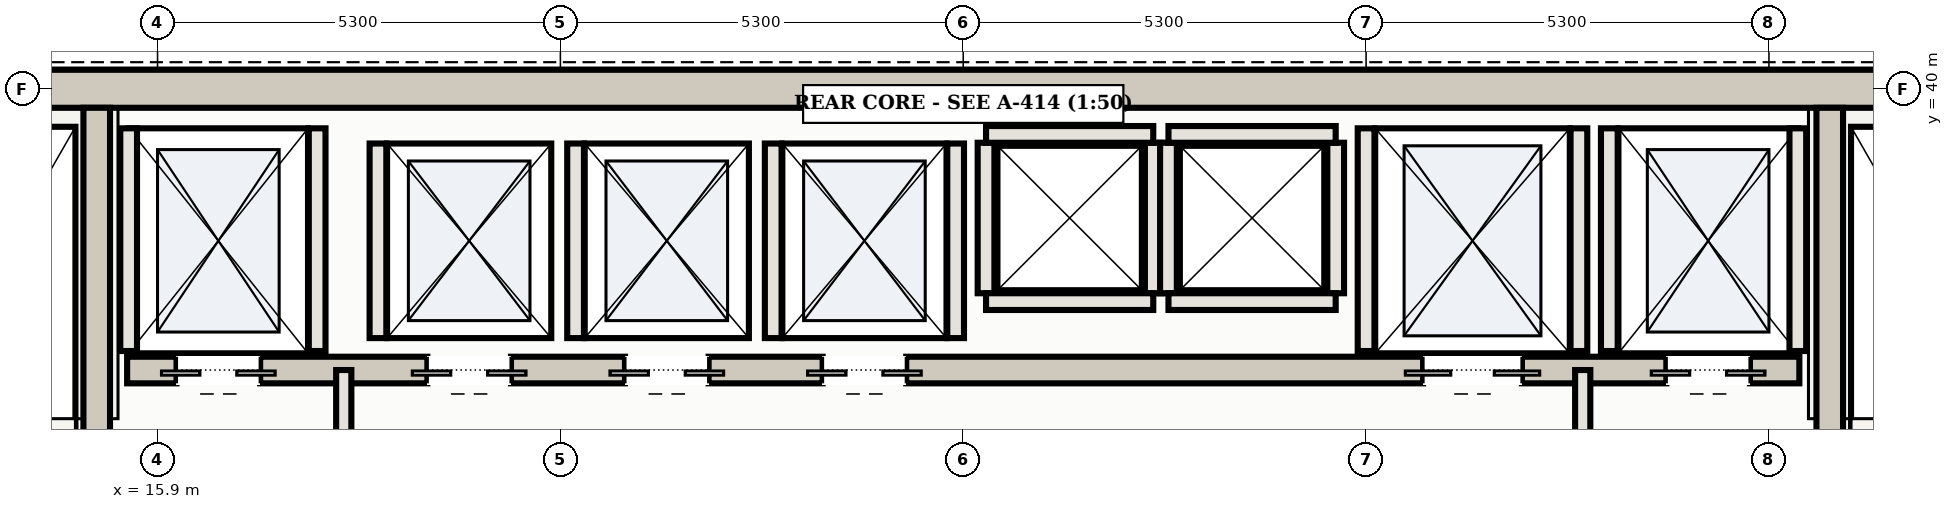
"""IFC4 building model, lengths in metres.
Left out: names, types, materials, properties, quantities, classifications, styles, units other than length and angle.
Written with IfcOpenShell. Run it as: python <this file> out.ifc"""

import sys

from ifc_helpers import new_model, si_unit, direction, frame, frame_2d, origin, place, context, subcontext, project, spatial, rectangle, extrude, element, fill, save


model = new_model("IFC4")
c1 = context("Model", 3, precision=1e-05, world=origin(), true_north=direction((0.0, 1.0)))
c2 = subcontext(c1, "Body", "Model", "MODEL_VIEW")
j1 = project(units=[si_unit("LENGTHUNIT", "METRE"), si_unit("PLANEANGLEUNIT", "RADIAN")], contexts=[c1])
p1 = place(None, origin())
s1 = spatial("IfcSite", under=j1, at=p1, CompositionType="ELEMENT")
p2 = place(p1, origin())
s2 = spatial("IfcBuilding", under=s1, at=p2, CompositionType="ELEMENT")
p3 = place(p2, frame((0.0, 0.0, 219.8)))
s3 = spatial("IfcBuildingStorey", under=s2, at=p3, CompositionType="ELEMENT", Elevation=219.8)
p4 = place(p3, frame((10.35, 40.0, 0.0), z_axis=(0.0, 0.0, 1.0), x_axis=(1.0, 0.0, 0.0)))
e1 = element("IfcWall", 1, at=p4, inside=s3, PredefinedType="SHEAR", context=c2, shape_type="SweptSolid", body=[
    extrude(rectangle(XDim=32.3, YDim=0.5, at=frame_2d((16.15, 0.0))), origin(), (0.0, 0.0, 1.0), 3.11),
])
p5 = place(p3, frame((15.1, 31.1, 0.0), z_axis=(0.0, 0.0, 1.0), x_axis=(0.0, 1.0, 0.0)))
e2 = element("IfcWall", 2, at=p5, inside=s3, PredefinedType="SHEAR", context=c2, shape_type="SweptSolid", body=[
    extrude(rectangle(XDim=8.65, YDim=0.35, at=frame_2d((4.325, 0.0))), origin(), (0.0, 0.0, 1.0), 3.11),
])
p6 = place(p5, frame((0.51, 0.0, 0.0)))
e3 = element("IfcOpeningElement", 3, at=p6, cuts=e2, PredefinedType="OPENING", context=c2, shape_type="SweptSolid", body=[
    extrude(rectangle(XDim=1.15, YDim=2.2, at=frame_2d((0.575, 1.1))), frame((0.0, 0.185, 0.0), z_axis=(0.0, -1.0, 0.0), x_axis=(1.0, 0.0, 0.0)), (0.0, 0.0, 1.0), 0.37),
])
p7 = place(p3, frame((37.9, 31.1, 0.0), z_axis=(0.0, 0.0, 1.0), x_axis=(0.0, 1.0, 0.0)))
e4 = element("IfcWall", 4, at=p7, inside=s3, PredefinedType="SHEAR", context=c2, shape_type="SweptSolid", body=[
    extrude(rectangle(XDim=8.65, YDim=0.35, at=frame_2d((4.325, 0.0))), origin(), (0.0, 0.0, 1.0), 3.11),
])
p8 = place(p7, frame((0.51, 0.0, 0.0)))
e5 = element("IfcOpeningElement", 5, at=p8, cuts=e4, PredefinedType="OPENING", context=c2, shape_type="SweptSolid", body=[
    extrude(rectangle(XDim=1.15, YDim=2.2, at=frame_2d((0.575, 1.1))), frame((0.0, 0.185, 0.0), z_axis=(0.0, -1.0, 0.0), x_axis=(1.0, 0.0, 0.0)), (0.0, 0.0, 1.0), 0.37),
])
p9 = place(p3, frame((15.5, 36.3, 0.0), z_axis=(0.0, 0.0, 1.0), x_axis=(1.0, 0.0, 0.0)))
e6 = element("IfcWall", 6, at=p9, inside=s3, PredefinedType="SHEAR", context=c2, shape_type="SweptSolid", body=[
    extrude(rectangle(XDim=22.0, YDim=0.35, at=frame_2d((11.0, 0.0))), origin(), (0.0, 0.0, 1.0), 3.11),
])
p10 = place(p9, frame((0.65, 0.0, 0.0)))
e7 = element("IfcOpeningElement", 7, at=p10, cuts=e6, PredefinedType="OPENING", context=c2, shape_type="SweptSolid", body=[
    extrude(rectangle(XDim=1.1, YDim=2.15, at=frame_2d((0.55, 1.075))), frame((0.0, 0.185, 0.0), z_axis=(0.0, -1.0, 0.0), x_axis=(1.0, 0.0, 0.0)), (0.0, 0.0, 1.0), 0.37),
])
p11 = place(p9, frame((20.25, 0.0, 0.0)))
e8 = element("IfcOpeningElement", 8, at=p11, cuts=e6, PredefinedType="OPENING", context=c2, shape_type="SweptSolid", body=[
    extrude(rectangle(XDim=1.1, YDim=2.15, at=frame_2d((0.55, 1.075))), frame((0.0, 0.185, 0.0), z_axis=(0.0, -1.0, 0.0), x_axis=(1.0, 0.0, 0.0)), (0.0, 0.0, 1.0), 0.37),
])
p12 = place(p9, frame((17.05, 0.0, 0.0)))
e9 = element("IfcOpeningElement", 9, at=p12, cuts=e6, PredefinedType="OPENING", context=c2, shape_type="SweptSolid", body=[
    extrude(rectangle(XDim=1.3, YDim=2.2, at=frame_2d((0.65, 1.1))), frame((0.0, 0.185, 0.0), z_axis=(0.0, -1.0, 0.0), x_axis=(1.0, 0.0, 0.0)), (0.0, 0.0, 1.0), 0.37),
])
p13 = place(p9, frame((3.95, 0.0, 0.0)))
e10 = element("IfcOpeningElement", 10, at=p13, cuts=e6, PredefinedType="OPENING", context=c2, shape_type="SweptSolid", body=[
    extrude(rectangle(XDim=1.1, YDim=2.15, at=frame_2d((0.55, 1.075))), frame((0.0, 0.185, 0.0), z_axis=(0.0, -1.0, 0.0), x_axis=(1.0, 0.0, 0.0)), (0.0, 0.0, 1.0), 0.37),
])
p14 = place(p9, frame((6.55, 0.0, 0.0)))
e11 = element("IfcOpeningElement", 11, at=p14, cuts=e6, PredefinedType="OPENING", context=c2, shape_type="SweptSolid", body=[
    extrude(rectangle(XDim=1.1, YDim=2.15, at=frame_2d((0.55, 1.075))), frame((0.0, 0.185, 0.0), z_axis=(0.0, -1.0, 0.0), x_axis=(1.0, 0.0, 0.0)), (0.0, 0.0, 1.0), 0.37),
])
p15 = place(p9, frame((9.15, 0.0, 0.0)))
e12 = element("IfcOpeningElement", 12, at=p15, cuts=e6, PredefinedType="OPENING", context=c2, shape_type="SweptSolid", body=[
    extrude(rectangle(XDim=1.1, YDim=2.15, at=frame_2d((0.55, 1.075))), frame((0.0, 0.185, 0.0), z_axis=(0.0, -1.0, 0.0), x_axis=(1.0, 0.0, 0.0)), (0.0, 0.0, 1.0), 0.37),
])
for number, where, z_axis, x_axis in (
    (13, (15.52, 36.55, 0.0), (0.0, 0.0, 1.0), (0.0, 1.0, 0.0)),
    (14, (18.0, 36.55, 0.0), (0.0, 0.0, 1.0), (0.0, 1.0, 0.0)),
    (15, (35.0, 36.55, 0.0), (0.0, 0.0, 1.0), (0.0, 1.0, 0.0)),
    (16, (37.48, 36.55, 0.0), (0.0, 0.0, 1.0), (0.0, 1.0, 0.0)),
    (17, (31.8, 36.55, 0.0), (0.0, 0.0, 1.0), (0.0, 1.0, 0.0)),
    (18, (34.6, 36.55, 0.0), (0.0, 0.0, 1.0), (0.0, 1.0, 0.0)),
):
    element("IfcWall", number, at=place(p3, frame(where, z_axis=z_axis, x_axis=x_axis)), inside=s3, PredefinedType="SOLIDWALL", context=c2, shape_type="SweptSolid", body=[
        extrude(rectangle(XDim=2.93, YDim=0.22, at=frame_2d((1.465, 0.0))), origin(), (0.0, 0.0, 1.0), 3.11),
    ])
for number, where, z_axis, x_axis in (
    (19, (18.8, 36.72, 0.0), (0.0, 0.0, 1.0), (0.0, 1.0, 0.0)),
    (20, (21.4, 36.72, 0.0), (0.0, 0.0, 1.0), (0.0, 1.0, 0.0)),
    (21, (24.0, 36.72, 0.0), (0.0, 0.0, 1.0), (0.0, 1.0, 0.0)),
    (22, (26.4, 36.72, 0.0), (0.0, 0.0, 1.0), (0.0, 1.0, 0.0)),
):
    element("IfcWall", number, at=place(p3, frame(where, z_axis=z_axis, x_axis=x_axis)), inside=s3, PredefinedType="SOLIDWALL", context=c2, shape_type="SweptSolid", body=[
        extrude(rectangle(XDim=2.56, YDim=0.22, at=frame_2d((1.28, 0.0))), origin(), (0.0, 0.0, 1.0), 3.11),
    ])
for number, where, z_axis, x_axis in (
    (23, (26.8, 37.31, 0.0), (0.0, 0.0, 1.0), (0.0, 1.0, 0.0)),
    (24, (29.0, 37.31, 0.0), (0.0, 0.0, 1.0), (0.0, 1.0, 0.0)),
):
    element("IfcWall", number, at=place(p3, frame(where, z_axis=z_axis, x_axis=x_axis)), inside=s3, PredefinedType="SOLIDWALL", context=c2, shape_type="SweptSolid", body=[
        extrude(rectangle(XDim=1.98, YDim=0.22, at=frame_2d((0.99, 0.0))), origin(), (0.0, 0.0, 1.0), 3.11),
    ])
for number, where, z_axis, x_axis in (
    (25, (26.8, 39.4, 0.0), (0.0, 0.0, 1.0), (1.0, 0.0, 0.0)),
    (26, (26.8, 37.2, 0.0), (0.0, 0.0, 1.0), (1.0, 0.0, 0.0)),
):
    element("IfcWall", number, at=place(p3, frame(where, z_axis=z_axis, x_axis=x_axis)), inside=s3, PredefinedType="SOLIDWALL", context=c2, shape_type="SweptSolid", body=[
        extrude(rectangle(XDim=2.2, YDim=0.22, at=frame_2d((1.1, 0.0))), origin(), (0.0, 0.0, 1.0), 3.11),
    ])
for number, where, z_axis, x_axis in (
    (27, (29.2, 37.31, 0.0), (0.0, 0.0, 1.0), (0.0, 1.0, 0.0)),
    (28, (31.4, 37.31, 0.0), (0.0, 0.0, 1.0), (0.0, 1.0, 0.0)),
):
    element("IfcWall", number, at=place(p3, frame(where, z_axis=z_axis, x_axis=x_axis)), inside=s3, PredefinedType="SOLIDWALL", context=c2, shape_type="SweptSolid", body=[
        extrude(rectangle(XDim=1.98, YDim=0.22, at=frame_2d((0.99, 0.0))), origin(), (0.0, 0.0, 1.0), 3.11),
    ])
for number, where, z_axis, x_axis in (
    (29, (29.2, 39.4, 0.0), (0.0, 0.0, 1.0), (1.0, 0.0, 0.0)),
    (30, (29.2, 37.2, 0.0), (0.0, 0.0, 1.0), (1.0, 0.0, 0.0)),
):
    element("IfcWall", number, at=place(p3, frame(where, z_axis=z_axis, x_axis=x_axis)), inside=s3, PredefinedType="SOLIDWALL", context=c2, shape_type="SweptSolid", body=[
        extrude(rectangle(XDim=2.2, YDim=0.22, at=frame_2d((1.1, 0.0))), origin(), (0.0, 0.0, 1.0), 3.11),
    ])
p16 = place(p3, frame((18.35, 31.15, 0.0), z_axis=(0.0, 0.0, 1.0), x_axis=(0.0, 1.0, 0.0)))
e31 = element("IfcWall", 31, at=p16, inside=s3, PredefinedType="PARTITIONING", context=c2, shape_type="SweptSolid", body=[
    extrude(rectangle(XDim=5.15, YDim=0.2, at=frame_2d((2.575, 0.0))), origin(), (0.0, 0.0, 1.0), 2.43),
])
p17 = place(p16, frame((1.875, 0.0, 0.0)))
e32 = element("IfcOpeningElement", 32, at=p17, cuts=e31, PredefinedType="OPENING", context=c2, shape_type="SweptSolid", body=[
    extrude(rectangle(XDim=1.25, YDim=2.2, at=frame_2d((0.625, 1.1))), frame((0.0, 0.11, 0.0), z_axis=(0.0, -1.0, 0.0), x_axis=(1.0, 0.0, 0.0)), (0.0, 0.0, 1.0), 0.22),
])
p18 = place(p3, frame((34.65, 31.15, 0.0), z_axis=(0.0, 0.0, 1.0), x_axis=(0.0, 1.0, 0.0)))
e33 = element("IfcWall", 33, at=p18, inside=s3, PredefinedType="PARTITIONING", context=c2, shape_type="SweptSolid", body=[
    extrude(rectangle(XDim=5.15, YDim=0.2, at=frame_2d((2.575, 0.0))), origin(), (0.0, 0.0, 1.0), 2.43),
])
p19 = place(p18, frame((1.875, 0.0, 0.0)))
e34 = element("IfcOpeningElement", 34, at=p19, cuts=e33, PredefinedType="OPENING", context=c2, shape_type="SweptSolid", body=[
    extrude(rectangle(XDim=1.25, YDim=2.2, at=frame_2d((0.625, 1.1))), frame((0.0, 0.11, 0.0), z_axis=(0.0, -1.0, 0.0), x_axis=(1.0, 0.0, 0.0)), (0.0, 0.0, 1.0), 0.22),
])
p20 = place(p10, frame((1.1, 0.0, 0.0), z_axis=(0.0, 0.0, 1.0), x_axis=(-1.0, 0.0, 0.0)))
e35 = element("IfcDoor", 35, at=p20, inside=s3, OperationType="DOUBLE_DOOR_SLIDING", PredefinedType="DOOR", context=c2, shape_type="SweptSolid", body=[
    extrude(rectangle(XDim=1.1, YDim=2.15, at=frame_2d((0.55, 1.075))), frame((0.0, 0.025, 0.0), z_axis=(0.0, -1.0, 0.0), x_axis=(1.0, 0.0, 0.0)), (0.0, 0.0, 1.0), 0.05),
])
fill(e7, e35)
p21 = place(p11, frame((1.1, 0.0, 0.0), z_axis=(0.0, 0.0, 1.0), x_axis=(-1.0, 0.0, 0.0)))
e36 = element("IfcDoor", 36, at=p21, inside=s3, OperationType="DOUBLE_DOOR_SLIDING", PredefinedType="DOOR", context=c2, shape_type="SweptSolid", body=[
    extrude(rectangle(XDim=1.1, YDim=2.15, at=frame_2d((0.55, 1.075))), frame((0.0, 0.025, 0.0), z_axis=(0.0, -1.0, 0.0), x_axis=(1.0, 0.0, 0.0)), (0.0, 0.0, 1.0), 0.05),
])
fill(e8, e36)
p22 = place(p12, frame((1.3, 0.0, 0.0), z_axis=(0.0, 0.0, 1.0), x_axis=(-1.0, 0.0, 0.0)))
e37 = element("IfcDoor", 37, at=p22, inside=s3, OperationType="DOUBLE_DOOR_SLIDING", PredefinedType="DOOR", context=c2, shape_type="SweptSolid", body=[
    extrude(rectangle(XDim=1.3, YDim=2.2, at=frame_2d((0.65, 1.1))), frame((0.0, 0.025, 0.0), z_axis=(0.0, -1.0, 0.0), x_axis=(1.0, 0.0, 0.0)), (0.0, 0.0, 1.0), 0.05),
])
fill(e9, e37)
p23 = place(p13, frame((1.1, 0.0, 0.0), z_axis=(0.0, 0.0, 1.0), x_axis=(-1.0, 0.0, 0.0)))
e38 = element("IfcDoor", 38, at=p23, inside=s3, OperationType="DOUBLE_DOOR_SLIDING", PredefinedType="DOOR", context=c2, shape_type="SweptSolid", body=[
    extrude(rectangle(XDim=1.1, YDim=2.15, at=frame_2d((0.55, 1.075))), frame((0.0, 0.025, 0.0), z_axis=(0.0, -1.0, 0.0), x_axis=(1.0, 0.0, 0.0)), (0.0, 0.0, 1.0), 0.05),
])
fill(e10, e38)
p24 = place(p14, frame((1.1, 0.0, 0.0), z_axis=(0.0, 0.0, 1.0), x_axis=(-1.0, 0.0, 0.0)))
e39 = element("IfcDoor", 39, at=p24, inside=s3, OperationType="DOUBLE_DOOR_SLIDING", PredefinedType="DOOR", context=c2, shape_type="SweptSolid", body=[
    extrude(rectangle(XDim=1.1, YDim=2.15, at=frame_2d((0.55, 1.075))), frame((0.0, 0.025, 0.0), z_axis=(0.0, -1.0, 0.0), x_axis=(1.0, 0.0, 0.0)), (0.0, 0.0, 1.0), 0.05),
])
fill(e11, e39)
p25 = place(p15, frame((1.1, 0.0, 0.0), z_axis=(0.0, 0.0, 1.0), x_axis=(-1.0, 0.0, 0.0)))
e40 = element("IfcDoor", 40, at=p25, inside=s3, OperationType="DOUBLE_DOOR_SLIDING", PredefinedType="DOOR", context=c2, shape_type="SweptSolid", body=[
    extrude(rectangle(XDim=1.1, YDim=2.15, at=frame_2d((0.55, 1.075))), frame((0.0, 0.025, 0.0), z_axis=(0.0, -1.0, 0.0), x_axis=(1.0, 0.0, 0.0)), (0.0, 0.0, 1.0), 0.05),
])
fill(e12, e40)
save(model, sys.argv[1])
